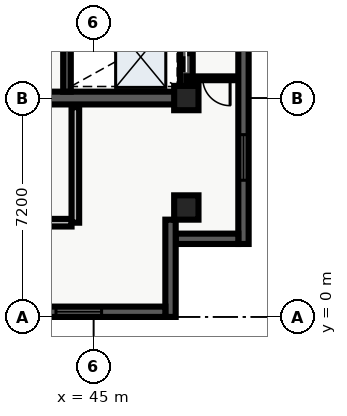
"""IFC4 building model, lengths in metres.
Left out: names, types, materials, properties, quantities, classifications, styles, units other than length and angle.
Written with IfcOpenShell. Run it as: python <this file> out.ifc"""

import sys

from ifc_helpers import new_model, entity, si_unit, converted_unit, direction, frame, origin_with_axes, origin_2d_with_axis, place, context, subcontext, project, spatial, polyline, rectangle, outline, extrude, element, fill, save


model = new_model("IFC4")
c1 = context("Model", 3, precision=1e-05, world=origin_with_axes(), true_north=direction((0.0, 1.0)))
c2 = subcontext(c1, "Body", "Model", "MODEL_VIEW")
j1 = project(units=[si_unit("LENGTHUNIT", "METRE"), converted_unit("PLANEANGLEUNIT", "DEGREE", entity("IfcPlaneAngleMeasure", 0.017), si_unit("PLANEANGLEUNIT", "RADIAN"), dimensions=[0, 0, 0, 0, 0, 0, 0])], contexts=[c1])
p1 = place(None, origin_with_axes())
s1 = spatial("IfcSite", under=j1, at=p1, CompositionType="ELEMENT")
p2 = place(p1, origin_with_axes())
s2 = spatial("IfcBuilding", under=s1, at=p2, CompositionType="ELEMENT")
p3 = place(p2, frame((0.0, 0.0, 284.1), z_axis=(0.0, 0.0, 1.0), x_axis=(1.0, 0.0, 0.0)))
s3 = spatial("IfcBuildingStorey", under=s2, at=p3, CompositionType="ELEMENT", Elevation=284.1)
p4 = place(p3, frame((40.2, 7.2, 0.0), z_axis=(0.0, 0.0, 1.0), x_axis=(1.0, 0.0, 0.0)))
e1 = element("IfcWall", 1, at=p4, inside=s3, PredefinedType="SHEAR", context=c2, shape_type="SweptSolid", body=[
    extrude(outline(polyline([(0.0, -0.21), (7.85, -0.21), (7.85, 0.21), (0.0, 0.21), (0.0, -0.21)])), origin_with_axes(), (0.0, 0.0, 1.0), 3.6),
])
p5 = place(p4, frame((2.175, 0.0, 0.0), z_axis=(0.0, 0.0, 1.0), x_axis=(1.0, 0.0, 0.0)))
e2 = element("IfcOpeningElement", 2, at=p5, cuts=e1, PredefinedType="OPENING", context=c2, shape_type="SweptSolid", body=[
    extrude(rectangle(XDim=1.05, YDim=0.44, at=origin_2d_with_axis()), origin_with_axes(), (0.0, 0.0, 1.0), 2.15),
])
p6 = place(p3, frame((48.05, 7.2, 0.0), z_axis=(0.0, 0.0, 1.0), x_axis=(0.0, 1.0, 0.0)))
e3 = element("IfcWall", 3, at=p6, inside=s3, PredefinedType="SHEAR", context=c2, shape_type="SweptSolid", body=[
    extrude(outline(polyline([(0.0, -0.21), (15.6, -0.21), (15.6, 0.21), (0.0, 0.21), (0.0, -0.21)])), origin_with_axes(), (0.0, 0.0, 1.0), 3.6),
])
p7 = place(p6, frame((1.375, 0.0, 0.0), z_axis=(0.0, 0.0, 1.0), x_axis=(1.0, 0.0, 0.0)))
e4 = element("IfcOpeningElement", 4, at=p7, cuts=e3, PredefinedType="OPENING", context=c2, shape_type="SweptSolid", body=[
    extrude(rectangle(XDim=1.05, YDim=0.44, at=origin_2d_with_axis()), origin_with_axes(), (0.0, 0.0, 1.0), 2.15),
])
p8 = place(p6, frame((5.125, 0.0, 0.0), z_axis=(0.0, 0.0, 1.0), x_axis=(1.0, 0.0, 0.0)))
e5 = element("IfcOpeningElement", 5, at=p8, cuts=e3, PredefinedType="OPENING", context=c2, shape_type="SweptSolid", body=[
    extrude(rectangle(XDim=0.95, YDim=0.44, at=origin_2d_with_axis()), origin_with_axes(), (0.0, 0.0, 1.0), 2.15),
])
p9 = place(p3, frame((44.125, 7.41, 0.0), z_axis=(0.0, 0.0, 1.0), x_axis=(0.0, 1.0, 0.0)))
e6 = element("IfcWall", 6, at=p9, inside=s3, PredefinedType="SHEAR", context=c2, shape_type="SweptSolid", body=[
    extrude(outline(polyline([(0.0, -0.125), (15.18, -0.125), (15.18, 0.125), (0.0, 0.125), (0.0, -0.125)])), origin_with_axes(), (0.0, 0.0, 1.0), 3.6),
])
p10 = place(p3, frame((40.325, 3.1, 0.0), z_axis=(0.0, 0.0, 1.0), x_axis=(1.0, 0.0, 0.0)))
e7 = element("IfcWall", 7, at=p10, inside=s3, PredefinedType="SOLIDWALL", context=c2, shape_type="SweptSolid", body=[
    extrude(outline(polyline([(0.0, -0.125), (3.95, -0.125), (3.95, 0.125), (0.0, 0.125), (0.0, -0.125)])), origin_with_axes(), (0.0, 0.0, 1.0), 2.64),
])
p11 = place(p3, frame((44.4, 3.1, 0.0), z_axis=(0.0, 0.0, 1.0), x_axis=(0.0, 1.0, 0.0)))
e8 = element("IfcWall", 8, at=p11, inside=s3, PredefinedType="SOLIDWALL", context=c2, shape_type="SweptSolid", body=[
    extrude(outline(polyline([(0.0, -0.125), (3.8, -0.125), (3.8, 0.125), (0.0, 0.125), (0.0, -0.125)])), origin_with_axes(), (0.0, 0.0, 1.0), 2.64),
])
for number, where, z_axis, x_axis in (
    (9, (48.05, 3.6, 0.0), (0.0, 0.0, 1.0), (1.0, 0.0, 0.0)),
    (10, (48.05, 7.2, 0.0), (0.0, 0.0, 1.0), (1.0, 0.0, 0.0)),
):
    element("IfcColumn", number, at=place(p3, frame(where, z_axis=z_axis, x_axis=x_axis)), inside=s3, PredefinedType="COLUMN", context=c2, shape_type="SweptSolid", body=[
        extrude(rectangle(XDim=0.8, YDim=0.8, at=origin_2d_with_axis()), origin_with_axes(), (0.0, 0.0, 1.0), 3.9),
    ])
p12 = place(p3, frame((49.765, 7.85, 0.0), z_axis=(0.0, 0.0, 1.0), x_axis=(-1.0, 0.0, 0.0)))
e11 = element("IfcWall", 11, at=p12, inside=s3, PredefinedType="PARTITIONING", context=c2, shape_type="SweptSolid", body=[
    extrude(outline(polyline([(0.0, -0.062), (1.715, -0.062), (1.715, 0.062), (0.0, 0.062), (0.0, -0.062)])), origin_with_axes(), (0.0, 0.0, 1.0), 2.64),
])
p13 = place(p12, frame((0.725, 0.0, 0.0), z_axis=(0.0, 0.0, 1.0), x_axis=(1.0, 0.0, 0.0)))
e12 = element("IfcOpeningElement", 12, at=p13, cuts=e11, PredefinedType="OPENING", context=c2, shape_type="SweptSolid", body=[
    extrude(rectangle(XDim=0.9, YDim=0.145, at=origin_2d_with_axis()), origin_with_axes(), (0.0, 0.0, 1.0), 2.15),
])
p14 = place(p3, frame((49.93, 26.06, 0.0), z_axis=(0.0, 0.0, 1.0), x_axis=(0.0, -1.0, 0.0)))
e13 = element("IfcWall", 13, at=p14, inside=s3, PredefinedType="SOLIDWALL", context=c2, shape_type="SweptSolid", body=[
    extrude(outline(polyline([(0.0, -0.17), (23.66, -0.17), (23.66, 0.17), (0.0, 0.17), (0.0, -0.17)])), origin_with_axes(), (0.0, 0.0, 1.0), 3.6),
])
p15 = place(p14, frame((2.846, 0.0, 0.45), z_axis=(0.0, 0.0, 1.0), x_axis=(1.0, 0.0, 0.0)))
e14 = element("IfcOpeningElement", 14, at=p15, cuts=e13, PredefinedType="OPENING", context=c2, shape_type="SweptSolid", body=[
    extrude(rectangle(XDim=1.5, YDim=0.36, at=origin_2d_with_axis()), origin_with_axes(), (0.0, 0.0, 1.0), 2.1),
])
p16 = place(p14, frame((7.338, 0.0, 0.45), z_axis=(0.0, 0.0, 1.0), x_axis=(1.0, 0.0, 0.0)))
e15 = element("IfcOpeningElement", 15, at=p16, cuts=e13, PredefinedType="OPENING", context=c2, shape_type="SweptSolid", body=[
    extrude(rectangle(XDim=1.5, YDim=0.36, at=origin_2d_with_axis()), origin_with_axes(), (0.0, 0.0, 1.0), 2.1),
])
p17 = place(p14, frame((11.83, 0.0, 0.45), z_axis=(0.0, 0.0, 1.0), x_axis=(1.0, 0.0, 0.0)))
e16 = element("IfcOpeningElement", 16, at=p17, cuts=e13, PredefinedType="OPENING", context=c2, shape_type="SweptSolid", body=[
    extrude(rectangle(XDim=1.5, YDim=0.36, at=origin_2d_with_axis()), origin_with_axes(), (0.0, 0.0, 1.0), 2.1),
])
p18 = place(p14, frame((16.322, 0.0, 0.45), z_axis=(0.0, 0.0, 1.0), x_axis=(1.0, 0.0, 0.0)))
e17 = element("IfcOpeningElement", 17, at=p18, cuts=e13, PredefinedType="OPENING", context=c2, shape_type="SweptSolid", body=[
    extrude(rectangle(XDim=1.5, YDim=0.36, at=origin_2d_with_axis()), origin_with_axes(), (0.0, 0.0, 1.0), 2.1),
])
p19 = place(p14, frame((20.814, 0.0, 0.45), z_axis=(0.0, 0.0, 1.0), x_axis=(1.0, 0.0, 0.0)))
e18 = element("IfcOpeningElement", 18, at=p19, cuts=e13, PredefinedType="OPENING", context=c2, shape_type="SweptSolid", body=[
    extrude(rectangle(XDim=1.5, YDim=0.36, at=origin_2d_with_axis()), origin_with_axes(), (0.0, 0.0, 1.0), 2.1),
])
p20 = place(p3, frame((49.76, 2.57, 0.0), z_axis=(0.0, 0.0, 1.0), x_axis=(-1.0, 0.0, 0.0)))
e19 = element("IfcWall", 19, at=p20, inside=s3, PredefinedType="SOLIDWALL", context=c2, shape_type="SweptSolid", body=[
    extrude(outline(polyline([(0.0, -0.17), (2.06, -0.17), (2.06, 0.17), (0.0, 0.17), (0.0, -0.17)])), origin_with_axes(), (0.0, 0.0, 1.0), 3.6),
])
p21 = place(p3, frame((47.53, 3.2, 0.0), z_axis=(0.0, 0.0, 1.0), x_axis=(0.0, -1.0, 0.0)))
e20 = element("IfcWall", 20, at=p21, inside=s3, PredefinedType="SOLIDWALL", context=c2, shape_type="SweptSolid", body=[
    extrude(outline(polyline([(0.0, -0.17), (3.2, -0.17), (3.2, 0.17), (0.0, 0.17), (0.0, -0.17)])), origin_with_axes(), (0.0, 0.0, 1.0), 3.6),
])
p22 = place(p3, frame((47.36, 0.17, 0.0), z_axis=(0.0, 0.0, 1.0), x_axis=(-1.0, 0.0, 0.0)))
e21 = element("IfcWall", 21, at=p22, inside=s3, PredefinedType="SOLIDWALL", context=c2, shape_type="SweptSolid", body=[
    extrude(outline(polyline([(0.0, -0.17), (37.16, -0.17), (37.16, 0.17), (0.0, 0.17), (0.0, -0.17)])), origin_with_axes(), (0.0, 0.0, 1.0), 3.6),
])
p23 = place(p22, frame((2.847, 0.0, 0.45), z_axis=(0.0, 0.0, 1.0), x_axis=(1.0, 0.0, 0.0)))
e22 = element("IfcOpeningElement", 22, at=p23, cuts=e21, PredefinedType="OPENING", context=c2, shape_type="SweptSolid", body=[
    extrude(rectangle(XDim=1.5, YDim=0.36, at=origin_2d_with_axis()), origin_with_axes(), (0.0, 0.0, 1.0), 2.1),
])
p24 = place(p22, frame((7.342, 0.0, 0.45), z_axis=(0.0, 0.0, 1.0), x_axis=(1.0, 0.0, 0.0)))
e23 = element("IfcOpeningElement", 23, at=p24, cuts=e21, PredefinedType="OPENING", context=c2, shape_type="SweptSolid", body=[
    extrude(rectangle(XDim=1.5, YDim=0.36, at=origin_2d_with_axis()), origin_with_axes(), (0.0, 0.0, 1.0), 2.1),
])
p25 = place(p22, frame((11.837, 0.0, 0.45), z_axis=(0.0, 0.0, 1.0), x_axis=(1.0, 0.0, 0.0)))
e24 = element("IfcOpeningElement", 24, at=p25, cuts=e21, PredefinedType="OPENING", context=c2, shape_type="SweptSolid", body=[
    extrude(rectangle(XDim=1.5, YDim=0.36, at=origin_2d_with_axis()), origin_with_axes(), (0.0, 0.0, 1.0), 2.1),
])
p26 = place(p22, frame((16.332, 0.0, 0.45), z_axis=(0.0, 0.0, 1.0), x_axis=(1.0, 0.0, 0.0)))
e25 = element("IfcOpeningElement", 25, at=p26, cuts=e21, PredefinedType="OPENING", context=c2, shape_type="SweptSolid", body=[
    extrude(rectangle(XDim=1.5, YDim=0.36, at=origin_2d_with_axis()), origin_with_axes(), (0.0, 0.0, 1.0), 2.1),
])
p27 = place(p22, frame((20.827, 0.0, 0.45), z_axis=(0.0, 0.0, 1.0), x_axis=(1.0, 0.0, 0.0)))
e26 = element("IfcOpeningElement", 26, at=p27, cuts=e21, PredefinedType="OPENING", context=c2, shape_type="SweptSolid", body=[
    extrude(rectangle(XDim=1.5, YDim=0.36, at=origin_2d_with_axis()), origin_with_axes(), (0.0, 0.0, 1.0), 2.1),
])
p28 = place(p22, frame((25.322, 0.0, 0.45), z_axis=(0.0, 0.0, 1.0), x_axis=(1.0, 0.0, 0.0)))
e27 = element("IfcOpeningElement", 27, at=p28, cuts=e21, PredefinedType="OPENING", context=c2, shape_type="SweptSolid", body=[
    extrude(rectangle(XDim=1.5, YDim=0.36, at=origin_2d_with_axis()), origin_with_axes(), (0.0, 0.0, 1.0), 2.1),
])
p29 = place(p22, frame((29.817, 0.0, 0.45), z_axis=(0.0, 0.0, 1.0), x_axis=(1.0, 0.0, 0.0)))
e28 = element("IfcOpeningElement", 28, at=p29, cuts=e21, PredefinedType="OPENING", context=c2, shape_type="SweptSolid", body=[
    extrude(rectangle(XDim=1.5, YDim=0.36, at=origin_2d_with_axis()), origin_with_axes(), (0.0, 0.0, 1.0), 2.1),
])
p30 = place(p22, frame((34.312, 0.0, 0.45), z_axis=(0.0, 0.0, 1.0), x_axis=(1.0, 0.0, 0.0)))
e29 = element("IfcOpeningElement", 29, at=p30, cuts=e21, PredefinedType="OPENING", context=c2, shape_type="SweptSolid", body=[
    extrude(rectangle(XDim=1.5, YDim=0.36, at=origin_2d_with_axis()), origin_with_axes(), (0.0, 0.0, 1.0), 2.1),
])
p31 = place(p6, frame((1.375, 0.0, 0.0), z_axis=(0.0, 0.0, 1.0), x_axis=(1.0, 0.0, 0.0)))
e30 = element("IfcDoor", 30, at=p31, inside=s3, OperationType="SLIDING_TO_LEFT", PredefinedType="DOOR", context=c2, shape_type="SweptSolid", body=[
    extrude(rectangle(XDim=1.05, YDim=0.09, at=origin_2d_with_axis()), origin_with_axes(), (0.0, 0.0, 1.0), 2.15),
])
fill(e4, e30)
p32 = place(p12, frame((0.725, 0.0, 0.0), z_axis=(0.0, 0.0, 1.0), x_axis=(1.0, 0.0, 0.0)))
e31 = element("IfcDoor", 31, at=p32, inside=s3, OperationType="SINGLE_SWING_LEFT", PredefinedType="DOOR", context=c2, shape_type="SweptSolid", body=[
    extrude(rectangle(XDim=0.9, YDim=0.075, at=origin_2d_with_axis()), origin_with_axes(), (0.0, 0.0, 1.0), 2.15),
])
fill(e12, e31)
p33 = place(p14, frame((20.814, 0.0, 0.45), z_axis=(0.0, 0.0, 1.0), x_axis=(1.0, 0.0, 0.0)))
e32 = element("IfcWindow", 32, at=p33, inside=s3, PredefinedType="WINDOW", context=c2, shape_type="SweptSolid", body=[
    extrude(rectangle(XDim=1.5, YDim=0.09, at=origin_2d_with_axis()), origin_with_axes(), (0.0, 0.0, 1.0), 2.1),
])
fill(e18, e32)
p34 = place(p22, frame((2.847, 0.0, 0.45), z_axis=(0.0, 0.0, 1.0), x_axis=(1.0, 0.0, 0.0)))
e33 = element("IfcWindow", 33, at=p34, inside=s3, PredefinedType="WINDOW", context=c2, shape_type="SweptSolid", body=[
    extrude(rectangle(XDim=1.5, YDim=0.09, at=origin_2d_with_axis()), origin_with_axes(), (0.0, 0.0, 1.0), 2.1),
])
fill(e22, e33)
save(model, sys.argv[1])
